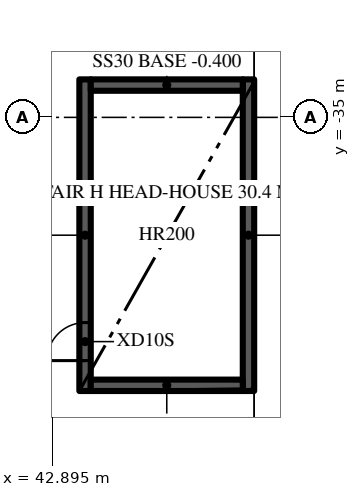
"""IFC4 building model, lengths in metres.
Left out: names, types, materials, properties, quantities, classifications, styles, units other than length and angle.
Written with IfcOpenShell. Run it as: python <this file> out.ifc"""

import sys

from ifc_helpers import new_model, si_unit, direction, frame, frame_2d, origin, place, context, subcontext, project, spatial, rectangle, extrude, element, fill, save


model = new_model("IFC4")
c1 = context("Model", 3, precision=1e-05, world=origin(), true_north=direction((0.0, 1.0)))
c2 = subcontext(c1, "Body", "Model", "MODEL_VIEW")
j1 = project(units=[si_unit("LENGTHUNIT", "METRE"), si_unit("PLANEANGLEUNIT", "RADIAN")], contexts=[c1])
p1 = place(None, origin())
s1 = spatial("IfcSite", under=j1, at=p1, CompositionType="ELEMENT")
p2 = place(p1, origin())
s2 = spatial("IfcBuilding", under=s1, at=p2, CompositionType="ELEMENT")
p3 = place(p2, origin())
s3 = spatial("IfcBuildingStorey", under=s2, at=p3, CompositionType="ELEMENT", Elevation=0.0)
p4 = place(p3, frame((43.75, -42.2, -0.4), z_axis=(0.0, 0.0, 1.0), x_axis=(0.0, 1.0, 0.0)))
e1 = element("IfcWall", 1, at=p4, inside=s3, PredefinedType="SOLIDWALL", context=c2, shape_type="SweptSolid", body=[
    extrude(rectangle(XDim=8.2, YDim=0.3, at=frame_2d((4.1, 0.0))), origin(), (0.0, 0.0, 1.0), 3.6),
])
p5 = place(p4, frame((0.8, 0.0, 0.4)))
e2 = element("IfcOpeningElement", 2, at=p5, cuts=e1, PredefinedType="OPENING", context=c2, shape_type="SweptSolid", body=[
    extrude(rectangle(XDim=1.0, YDim=2.2, at=frame_2d((0.5, 1.1))), frame((0.0, 0.16, 0.0), z_axis=(0.0, -1.0, 0.0), x_axis=(1.0, 0.0, 0.0)), (0.0, 0.0, 1.0), 0.32),
])
p6 = place(p3, frame((48.05, -34.0, -0.4), z_axis=(0.0, 0.0, 1.0), x_axis=(0.0, -1.0, 0.0)))
e3 = element("IfcWall", 3, at=p6, inside=s3, PredefinedType="SOLIDWALL", context=c2, shape_type="SweptSolid", body=[
    extrude(rectangle(XDim=8.2, YDim=0.3, at=frame_2d((4.1, 0.0))), origin(), (0.0, 0.0, 1.0), 3.6),
])
for number, where, z_axis, x_axis in (
    (4, (43.9, -42.05, -0.4), (0.0, 0.0, 1.0), (1.0, 0.0, 0.0)),
    (5, (47.9, -34.15, -0.4), (0.0, 0.0, 1.0), (-1.0, 0.0, 0.0)),
):
    element("IfcWall", number, at=place(p3, frame(where, z_axis=z_axis, x_axis=x_axis)), inside=s3, PredefinedType="SOLIDWALL", context=c2, shape_type="SweptSolid", body=[
        extrude(rectangle(XDim=4.0, YDim=0.3, at=frame_2d((2.0, 0.0))), origin(), (0.0, 0.0, 1.0), 3.6),
    ])
p7 = place(p5, origin())
e6 = element("IfcDoor", 6, at=p7, inside=s3, OperationType="SINGLE_SWING_LEFT", PredefinedType="DOOR", context=c2, shape_type="SweptSolid", body=[
    extrude(rectangle(XDim=1.0, YDim=2.2, at=frame_2d((0.5, 1.1))), frame((0.0, 0.025, 0.0), z_axis=(0.0, -1.0, 0.0), x_axis=(1.0, 0.0, 0.0)), (0.0, 0.0, 1.0), 0.05),
])
fill(e2, e6)
save(model, sys.argv[1])
